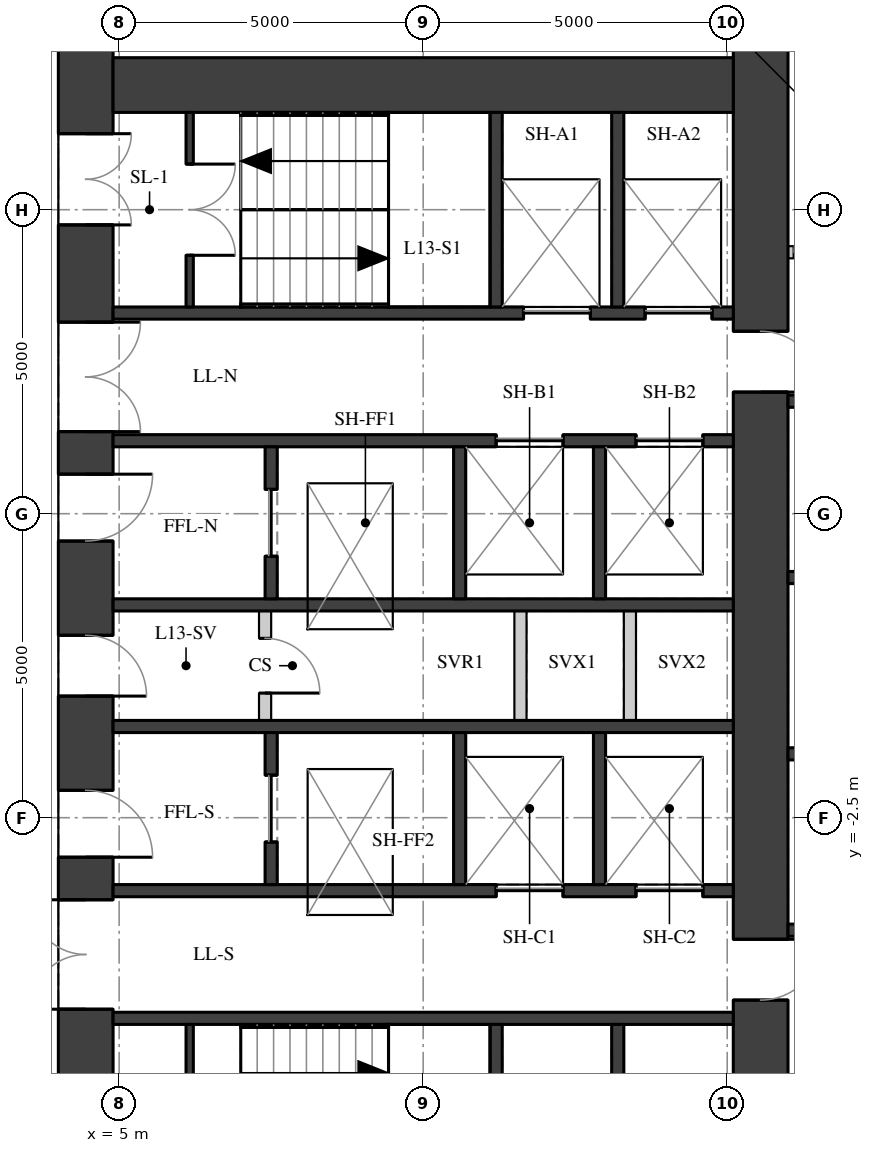
"""IFC4 building model, lengths in metres.
Left out: names, types, materials, properties, quantities, classifications, styles, units other than length and angle.
Written with IfcOpenShell. Run it as: python <this file> out.ifc"""

import sys

from ifc_helpers import new_model, si_unit, direction, frame, frame_2d, origin, place, context, subcontext, project, spatial, rectangle, extrude, element, fill, save


model = new_model("IFC4")
c1 = context("Model", 3, precision=1e-05, world=origin(), true_north=direction((0.0, 1.0)))
c2 = subcontext(c1, "Body", "Model", "MODEL_VIEW")
j1 = project(units=[si_unit("LENGTHUNIT", "METRE"), si_unit("PLANEANGLEUNIT", "RADIAN")], contexts=[c1])
p1 = place(None, origin())
s1 = spatial("IfcSite", under=j1, at=p1, CompositionType="ELEMENT")
p2 = place(p1, origin())
s2 = spatial("IfcBuilding", under=s1, at=p2, CompositionType="ELEMENT")
p3 = place(p2, frame((0.0, 0.0, 51.4)))
s3 = spatial("IfcBuildingStorey", under=s2, at=p3, CompositionType="ELEMENT", Elevation=51.4)
p4 = place(p3, frame((4.45, -11.1, 0.0), z_axis=(0.0, 0.0, 1.0), x_axis=(0.0, 1.0, 0.0)))
e1 = element("IfcWall", 1, at=p4, inside=s3, PredefinedType="SHEAR", context=c2, shape_type="SweptSolid", body=[
    extrude(rectangle(XDim=22.2, YDim=0.9, at=frame_2d((11.1, 0.0))), origin(), (0.0, 0.0, 1.0), 3.02),
])
p5 = place(p4, frame((2.35, 0.0, 0.0)))
e2 = element("IfcOpeningElement", 2, at=p5, cuts=e1, PredefinedType="OPENING", context=c2, shape_type="SweptSolid", body=[
    extrude(rectangle(XDim=1.5, YDim=2.1, at=frame_2d((0.75, 1.05))), frame((0.0, 0.46, 0.0), z_axis=(0.0, -1.0, 0.0), x_axis=(1.0, 0.0, 0.0)), (0.0, 0.0, 1.0), 0.92),
])
p6 = place(p4, frame((5.45, 0.0, 0.0)))
e3 = element("IfcOpeningElement", 3, at=p6, cuts=e1, PredefinedType="OPENING", context=c2, shape_type="SweptSolid", body=[
    extrude(rectangle(XDim=1.8, YDim=2.1, at=frame_2d((0.9, 1.05))), frame((0.0, 0.46, 0.0), z_axis=(0.0, -1.0, 0.0), x_axis=(1.0, 0.0, 0.0)), (0.0, 0.0, 1.0), 0.92),
])
p7 = place(p4, frame((7.95, 0.0, 0.0)))
e4 = element("IfcOpeningElement", 4, at=p7, cuts=e1, PredefinedType="OPENING", context=c2, shape_type="SweptSolid", body=[
    extrude(rectangle(XDim=1.1, YDim=2.1, at=frame_2d((0.55, 1.05))), frame((0.0, 0.46, 0.0), z_axis=(0.0, -1.0, 0.0), x_axis=(1.0, 0.0, 0.0)), (0.0, 0.0, 1.0), 0.92),
])
p8 = place(p4, frame((10.6, 0.0, 0.0)))
e5 = element("IfcOpeningElement", 5, at=p8, cuts=e1, PredefinedType="OPENING", context=c2, shape_type="SweptSolid", body=[
    extrude(rectangle(XDim=1.0, YDim=2.1, at=frame_2d((0.5, 1.05))), frame((0.0, 0.46, 0.0), z_axis=(0.0, -1.0, 0.0), x_axis=(1.0, 0.0, 0.0)), (0.0, 0.0, 1.0), 0.92),
])
p9 = place(p4, frame((13.15, 0.0, 0.0)))
e6 = element("IfcOpeningElement", 6, at=p9, cuts=e1, PredefinedType="OPENING", context=c2, shape_type="SweptSolid", body=[
    extrude(rectangle(XDim=1.1, YDim=2.1, at=frame_2d((0.55, 1.05))), frame((0.0, 0.46, 0.0), z_axis=(0.0, -1.0, 0.0), x_axis=(1.0, 0.0, 0.0)), (0.0, 0.0, 1.0), 0.92),
])
p10 = place(p4, frame((14.95, 0.0, 0.0)))
e7 = element("IfcOpeningElement", 7, at=p10, cuts=e1, PredefinedType="OPENING", context=c2, shape_type="SweptSolid", body=[
    extrude(rectangle(XDim=1.8, YDim=2.1, at=frame_2d((0.9, 1.05))), frame((0.0, 0.46, 0.0), z_axis=(0.0, -1.0, 0.0), x_axis=(1.0, 0.0, 0.0)), (0.0, 0.0, 1.0), 0.92),
])
p11 = place(p4, frame((18.35, 0.0, 0.0)))
e8 = element("IfcOpeningElement", 8, at=p11, cuts=e1, PredefinedType="OPENING", context=c2, shape_type="SweptSolid", body=[
    extrude(rectangle(XDim=1.5, YDim=2.1, at=frame_2d((0.75, 1.05))), frame((0.0, 0.46, 0.0), z_axis=(0.0, -1.0, 0.0), x_axis=(1.0, 0.0, 0.0)), (0.0, 0.0, 1.0), 0.92),
])
p12 = place(p3, frame((15.55, -11.1, 0.0), z_axis=(0.0, 0.0, 1.0), x_axis=(0.0, 1.0, 0.0)))
e9 = element("IfcWall", 9, at=p12, inside=s3, PredefinedType="SHEAR", context=c2, shape_type="SweptSolid", body=[
    extrude(rectangle(XDim=22.2, YDim=0.9, at=frame_2d((11.1, 0.0))), origin(), (0.0, 0.0, 1.0), 3.02),
])
p13 = place(p12, frame((15.6, 0.0, 0.0)))
e10 = element("IfcOpeningElement", 10, at=p13, cuts=e9, PredefinedType="OPENING", context=c2, shape_type="SweptSolid", body=[
    extrude(rectangle(XDim=1.0, YDim=2.1, at=frame_2d((0.5, 1.05))), frame((0.0, 0.46, 0.0), z_axis=(0.0, -1.0, 0.0), x_axis=(1.0, 0.0, 0.0)), (0.0, 0.0, 1.0), 0.92),
])
p14 = place(p12, frame((5.6, 0.0, 0.0)))
e11 = element("IfcOpeningElement", 11, at=p14, cuts=e9, PredefinedType="OPENING", context=c2, shape_type="SweptSolid", body=[
    extrude(rectangle(XDim=1.0, YDim=2.1, at=frame_2d((0.5, 1.05))), frame((0.0, 0.46, 0.0), z_axis=(0.0, -1.0, 0.0), x_axis=(1.0, 0.0, 0.0)), (0.0, 0.0, 1.0), 0.92),
])
p15 = place(p3, frame((4.9, 9.55, 0.0), z_axis=(0.0, 0.0, 1.0), x_axis=(1.0, 0.0, 0.0)))
e12 = element("IfcWall", 12, at=p15, inside=s3, PredefinedType="SHEAR", context=c2, shape_type="SweptSolid", body=[
    extrude(rectangle(XDim=10.2, YDim=0.9, at=frame_2d((5.1, 0.0))), origin(), (0.0, 0.0, 1.0), 3.02),
])
p16 = place(p3, frame((4.9, 5.8, 0.0), z_axis=(0.0, 0.0, 1.0), x_axis=(1.0, 0.0, 0.0)))
e13 = element("IfcWall", 13, at=p16, inside=s3, PredefinedType="SHEAR", context=c2, shape_type="SweptSolid", body=[
    extrude(rectangle(XDim=10.2, YDim=0.2, at=frame_2d((5.1, 0.0))), origin(), (0.0, 0.0, 1.0), 3.02),
])
p17 = place(p16, frame((6.75, 0.0, 0.0)))
e14 = element("IfcOpeningElement", 14, at=p17, cuts=e13, PredefinedType="OPENING", context=c2, shape_type="SweptSolid", body=[
    extrude(rectangle(XDim=1.1, YDim=2.1, at=frame_2d((0.55, 1.05))), frame((0.0, 0.11, 0.0), z_axis=(0.0, -1.0, 0.0), x_axis=(1.0, 0.0, 0.0)), (0.0, 0.0, 1.0), 0.22),
])
p18 = place(p16, frame((8.75, 0.0, 0.0)))
e15 = element("IfcOpeningElement", 15, at=p18, cuts=e13, PredefinedType="OPENING", context=c2, shape_type="SweptSolid", body=[
    extrude(rectangle(XDim=1.1, YDim=2.1, at=frame_2d((0.55, 1.05))), frame((0.0, 0.11, 0.0), z_axis=(0.0, -1.0, 0.0), x_axis=(1.0, 0.0, 0.0)), (0.0, 0.0, 1.0), 0.22),
])
p19 = place(p3, frame((4.9, 3.7, 0.0), z_axis=(0.0, 0.0, 1.0), x_axis=(1.0, 0.0, 0.0)))
e16 = element("IfcWall", 16, at=p19, inside=s3, PredefinedType="SHEAR", context=c2, shape_type="SweptSolid", body=[
    extrude(rectangle(XDim=10.2, YDim=0.2, at=frame_2d((5.1, 0.0))), origin(), (0.0, 0.0, 1.0), 3.02),
])
p20 = place(p19, frame((6.3, 0.0, 0.0)))
e17 = element("IfcOpeningElement", 17, at=p20, cuts=e16, PredefinedType="OPENING", context=c2, shape_type="SweptSolid", body=[
    extrude(rectangle(XDim=1.1, YDim=2.1, at=frame_2d((0.55, 1.05))), frame((0.0, 0.11, 0.0), z_axis=(0.0, -1.0, 0.0), x_axis=(1.0, 0.0, 0.0)), (0.0, 0.0, 1.0), 0.22),
])
p21 = place(p19, frame((8.6, 0.0, 0.0)))
e18 = element("IfcOpeningElement", 18, at=p21, cuts=e16, PredefinedType="OPENING", context=c2, shape_type="SweptSolid", body=[
    extrude(rectangle(XDim=1.1, YDim=2.1, at=frame_2d((0.55, 1.05))), frame((0.0, 0.11, 0.0), z_axis=(0.0, -1.0, 0.0), x_axis=(1.0, 0.0, 0.0)), (0.0, 0.0, 1.0), 0.22),
])
for number, where, z_axis, x_axis in (
    (19, (4.9, 1.0, 0.0), (0.0, 0.0, 1.0), (1.0, 0.0, 0.0)),
    (20, (4.9, -1.0, 0.0), (0.0, 0.0, 1.0), (1.0, 0.0, 0.0)),
):
    element("IfcWall", number, at=place(p3, frame(where, z_axis=z_axis, x_axis=x_axis)), inside=s3, PredefinedType="SHEAR", context=c2, shape_type="SweptSolid", body=[
        extrude(rectangle(XDim=10.2, YDim=0.2, at=frame_2d((5.1, 0.0))), origin(), (0.0, 0.0, 1.0), 3.02),
    ])
p22 = place(p3, frame((4.9, -3.7, 0.0), z_axis=(0.0, 0.0, 1.0), x_axis=(1.0, 0.0, 0.0)))
e21 = element("IfcWall", 21, at=p22, inside=s3, PredefinedType="SHEAR", context=c2, shape_type="SweptSolid", body=[
    extrude(rectangle(XDim=10.2, YDim=0.2, at=frame_2d((5.1, 0.0))), origin(), (0.0, 0.0, 1.0), 3.02),
])
p23 = place(p22, frame((6.3, 0.0, 0.0)))
e22 = element("IfcOpeningElement", 22, at=p23, cuts=e21, PredefinedType="OPENING", context=c2, shape_type="SweptSolid", body=[
    extrude(rectangle(XDim=1.1, YDim=2.1, at=frame_2d((0.55, 1.05))), frame((0.0, 0.11, 0.0), z_axis=(0.0, -1.0, 0.0), x_axis=(1.0, 0.0, 0.0)), (0.0, 0.0, 1.0), 0.22),
])
p24 = place(p22, frame((8.6, 0.0, 0.0)))
e23 = element("IfcOpeningElement", 23, at=p24, cuts=e21, PredefinedType="OPENING", context=c2, shape_type="SweptSolid", body=[
    extrude(rectangle(XDim=1.1, YDim=2.1, at=frame_2d((0.55, 1.05))), frame((0.0, 0.11, 0.0), z_axis=(0.0, -1.0, 0.0), x_axis=(1.0, 0.0, 0.0)), (0.0, 0.0, 1.0), 0.22),
])
p25 = place(p3, frame((4.9, -5.8, 0.0), z_axis=(0.0, 0.0, 1.0), x_axis=(1.0, 0.0, 0.0)))
e24 = element("IfcWall", 24, at=p25, inside=s3, PredefinedType="SHEAR", context=c2, shape_type="SweptSolid", body=[
    extrude(rectangle(XDim=10.2, YDim=0.2, at=frame_2d((5.1, 0.0))), origin(), (0.0, 0.0, 1.0), 3.02),
])
for number, where, z_axis, x_axis in (
    (25, (11.2, 5.9, 0.0), (0.0, 0.0, 1.0), (0.0, 1.0, 0.0)),
    (26, (11.2, -9.1, 0.0), (0.0, 0.0, 1.0), (0.0, 1.0, 0.0)),
    (27, (13.2, 5.9, 0.0), (0.0, 0.0, 1.0), (0.0, 1.0, 0.0)),
    (28, (13.2, -9.1, 0.0), (0.0, 0.0, 1.0), (0.0, 1.0, 0.0)),
):
    element("IfcWall", number, at=place(p3, frame(where, z_axis=z_axis, x_axis=x_axis)), inside=s3, PredefinedType="SHEAR", context=c2, shape_type="SweptSolid", body=[
        extrude(rectangle(XDim=3.2, YDim=0.2, at=frame_2d((1.6, 0.0))), origin(), (0.0, 0.0, 1.0), 3.02),
    ])
p26 = place(p3, frame((7.5, 1.1, 0.0), z_axis=(0.0, 0.0, 1.0), x_axis=(0.0, 1.0, 0.0)))
e29 = element("IfcWall", 29, at=p26, inside=s3, PredefinedType="SHEAR", context=c2, shape_type="SweptSolid", body=[
    extrude(rectangle(XDim=2.5, YDim=0.2, at=frame_2d((1.25, 0.0))), origin(), (0.0, 0.0, 1.0), 3.02),
])
p27 = place(p26, frame((0.7, 0.0, 0.0)))
e30 = element("IfcOpeningElement", 30, at=p27, cuts=e29, PredefinedType="OPENING", context=c2, shape_type="SweptSolid", body=[
    extrude(rectangle(XDim=1.1, YDim=2.1, at=frame_2d((0.55, 1.05))), frame((0.0, 0.11, 0.0), z_axis=(0.0, -1.0, 0.0), x_axis=(1.0, 0.0, 0.0)), (0.0, 0.0, 1.0), 0.22),
])
p28 = place(p3, frame((7.5, -3.6, 0.0), z_axis=(0.0, 0.0, 1.0), x_axis=(0.0, 1.0, 0.0)))
e31 = element("IfcWall", 31, at=p28, inside=s3, PredefinedType="SHEAR", context=c2, shape_type="SweptSolid", body=[
    extrude(rectangle(XDim=2.5, YDim=0.2, at=frame_2d((1.25, 0.0))), origin(), (0.0, 0.0, 1.0), 3.02),
])
p29 = place(p28, frame((0.7, 0.0, 0.0)))
e32 = element("IfcOpeningElement", 32, at=p29, cuts=e31, PredefinedType="OPENING", context=c2, shape_type="SweptSolid", body=[
    extrude(rectangle(XDim=1.1, YDim=2.1, at=frame_2d((0.55, 1.05))), frame((0.0, 0.11, 0.0), z_axis=(0.0, -1.0, 0.0), x_axis=(1.0, 0.0, 0.0)), (0.0, 0.0, 1.0), 0.22),
])
for number, where, z_axis, x_axis in (
    (33, (10.6, 1.1, 0.0), (0.0, 0.0, 1.0), (0.0, 1.0, 0.0)),
    (34, (10.6, -3.6, 0.0), (0.0, 0.0, 1.0), (0.0, 1.0, 0.0)),
    (35, (12.9, 1.1, 0.0), (0.0, 0.0, 1.0), (0.0, 1.0, 0.0)),
    (36, (12.9, -3.6, 0.0), (0.0, 0.0, 1.0), (0.0, 1.0, 0.0)),
):
    element("IfcWall", number, at=place(p3, frame(where, z_axis=z_axis, x_axis=x_axis)), inside=s3, PredefinedType="SHEAR", context=c2, shape_type="SweptSolid", body=[
        extrude(rectangle(XDim=2.5, YDim=0.2, at=frame_2d((1.25, 0.0))), origin(), (0.0, 0.0, 1.0), 3.02),
    ])
p30 = place(p3, frame((6.16, 5.9, 0.0), z_axis=(0.0, 0.0, 1.0), x_axis=(0.0, 1.0, 0.0)))
e37 = element("IfcWall", 37, at=p30, inside=s3, PredefinedType="SHEAR", context=c2, shape_type="SweptSolid", body=[
    extrude(rectangle(XDim=3.2, YDim=0.12, at=frame_2d((1.6, 0.0))), origin(), (0.0, 0.0, 1.0), 3.02),
])
p31 = place(p30, frame((0.85, 0.0, 0.0)))
e38 = element("IfcOpeningElement", 38, at=p31, cuts=e37, PredefinedType="OPENING", context=c2, shape_type="SweptSolid", body=[
    extrude(rectangle(XDim=1.5, YDim=2.1, at=frame_2d((0.75, 1.05))), frame((0.0, 0.07, 0.0), z_axis=(0.0, -1.0, 0.0), x_axis=(1.0, 0.0, 0.0)), (0.0, 0.0, 1.0), 0.14),
])
p32 = place(p3, frame((6.16, -9.1, 0.0), z_axis=(0.0, 0.0, 1.0), x_axis=(0.0, 1.0, 0.0)))
e39 = element("IfcWall", 39, at=p32, inside=s3, PredefinedType="SHEAR", context=c2, shape_type="SweptSolid", body=[
    extrude(rectangle(XDim=3.2, YDim=0.12, at=frame_2d((1.6, 0.0))), origin(), (0.0, 0.0, 1.0), 3.02),
])
p33 = place(p32, frame((0.85, 0.0, 0.0)))
e40 = element("IfcOpeningElement", 40, at=p33, cuts=e39, PredefinedType="OPENING", context=c2, shape_type="SweptSolid", body=[
    extrude(rectangle(XDim=1.5, YDim=2.1, at=frame_2d((0.75, 1.05))), frame((0.0, 0.07, 0.0), z_axis=(0.0, -1.0, 0.0), x_axis=(1.0, 0.0, 0.0)), (0.0, 0.0, 1.0), 0.14),
])
p34 = place(p3, frame((7.4, -0.9, 0.0), z_axis=(0.0, 0.0, 1.0), x_axis=(0.0, 1.0, 0.0)))
e41 = element("IfcWall", 41, at=p34, inside=s3, PredefinedType="PARTITIONING", context=c2, shape_type="SweptSolid", body=[
    extrude(rectangle(XDim=1.8, YDim=0.2, at=frame_2d((0.9, 0.0))), origin(), (0.0, 0.0, 1.0), 3.02),
])
p35 = place(p34, frame((0.45, 0.0, 0.0)))
e42 = element("IfcOpeningElement", 42, at=p35, cuts=e41, PredefinedType="OPENING", context=c2, shape_type="SweptSolid", body=[
    extrude(rectangle(XDim=0.9, YDim=2.1, at=frame_2d((0.45, 1.05))), frame((0.0, 0.11, 0.0), z_axis=(0.0, -1.0, 0.0), x_axis=(1.0, 0.0, 0.0)), (0.0, 0.0, 1.0), 0.22),
])
for number, where, z_axis, x_axis in (
    (43, (11.6, -0.9, 0.0), (0.0, 0.0, 1.0), (0.0, 1.0, 0.0)),
    (44, (13.4, -0.9, 0.0), (0.0, 0.0, 1.0), (0.0, 1.0, 0.0)),
):
    element("IfcWall", number, at=place(p3, frame(where, z_axis=z_axis, x_axis=x_axis)), inside=s3, PredefinedType="PARTITIONING", context=c2, shape_type="SweptSolid", body=[
        extrude(rectangle(XDim=1.8, YDim=0.2, at=frame_2d((0.9, 0.0))), origin(), (0.0, 0.0, 1.0), 3.02),
    ])
for number, where, z_axis, x_axis in (
    (45, (16.0, -4.35, 0.0), (0.0, 0.0, 1.0), (1.0, 0.0, 0.0)),
    (46, (16.0, -1.45, 0.0), (0.0, 0.0, 1.0), (1.0, 0.0, 0.0)),
    (47, (16.0, 1.45, 0.0), (0.0, 0.0, 1.0), (1.0, 0.0, 0.0)),
    (48, (16.0, 4.35, 0.0), (0.0, 0.0, 1.0), (1.0, 0.0, 0.0)),
):
    element("IfcWall", number, at=place(p3, frame(where, z_axis=z_axis, x_axis=x_axis)), inside=s3, PredefinedType="SHEAR", context=c2, shape_type="SweptSolid", body=[
        extrude(rectangle(XDim=2.3, YDim=0.2, at=frame_2d((1.15, 0.0))), origin(), (0.0, 0.0, 1.0), 3.02),
    ])
p36 = place(p3, frame((16.0, 6.8, 0.0), z_axis=(0.0, 0.0, 1.0), x_axis=(1.0, 0.0, 0.0)))
e49 = element("IfcWall", 49, at=p36, inside=s3, PredefinedType="PARTITIONING", context=c2, shape_type="SweptSolid", body=[
    extrude(rectangle(XDim=2.3, YDim=0.2, at=frame_2d((1.15, 0.0))), origin(), (0.0, 0.0, 1.0), 3.02),
])
p37 = place(p36, frame((0.1, 0.0, 0.0)))
e50 = element("IfcOpeningElement", 50, at=p37, cuts=e49, PredefinedType="OPENING", context=c2, shape_type="SweptSolid", body=[
    extrude(rectangle(XDim=0.9, YDim=2.1, at=frame_2d((0.45, 1.05))), frame((0.0, 0.11, 0.0), z_axis=(0.0, -1.0, 0.0), x_axis=(1.0, 0.0, 0.0)), (0.0, 0.0, 1.0), 0.22),
])
p38 = place(p6, origin())
e51 = element("IfcDoor", 51, at=p38, inside=s3, OperationType="DOUBLE_DOOR_SINGLE_SWING", PredefinedType="DOOR", context=c2, shape_type="SweptSolid", body=[
    extrude(rectangle(XDim=1.8, YDim=2.1, at=frame_2d((0.9, 1.05))), frame((0.0, 0.025, 0.0), z_axis=(0.0, -1.0, 0.0), x_axis=(1.0, 0.0, 0.0)), (0.0, 0.0, 1.0), 0.05),
])
fill(e3, e51)
p39 = place(p7, origin())
e52 = element("IfcDoor", 52, at=p39, inside=s3, OperationType="SINGLE_SWING_RIGHT", PredefinedType="DOOR", context=c2, shape_type="SweptSolid", body=[
    extrude(rectangle(XDim=1.1, YDim=2.1, at=frame_2d((0.55, 1.05))), frame((0.0, 0.025, 0.0), z_axis=(0.0, -1.0, 0.0), x_axis=(1.0, 0.0, 0.0)), (0.0, 0.0, 1.0), 0.05),
])
fill(e4, e52)
p40 = place(p8, origin())
e53 = element("IfcDoor", 53, at=p40, inside=s3, OperationType="SINGLE_SWING_RIGHT", PredefinedType="DOOR", context=c2, shape_type="SweptSolid", body=[
    extrude(rectangle(XDim=1.0, YDim=2.1, at=frame_2d((0.5, 1.05))), frame((0.0, 0.025, 0.0), z_axis=(0.0, -1.0, 0.0), x_axis=(1.0, 0.0, 0.0)), (0.0, 0.0, 1.0), 0.05),
])
fill(e5, e53)
p41 = place(p9, origin())
e54 = element("IfcDoor", 54, at=p41, inside=s3, OperationType="SINGLE_SWING_LEFT", PredefinedType="DOOR", context=c2, shape_type="SweptSolid", body=[
    extrude(rectangle(XDim=1.1, YDim=2.1, at=frame_2d((0.55, 1.05))), frame((0.0, 0.025, 0.0), z_axis=(0.0, -1.0, 0.0), x_axis=(1.0, 0.0, 0.0)), (0.0, 0.0, 1.0), 0.05),
])
fill(e6, e54)
p42 = place(p10, origin())
e55 = element("IfcDoor", 55, at=p42, inside=s3, OperationType="DOUBLE_DOOR_SINGLE_SWING", PredefinedType="DOOR", context=c2, shape_type="SweptSolid", body=[
    extrude(rectangle(XDim=1.8, YDim=2.1, at=frame_2d((0.9, 1.05))), frame((0.0, 0.025, 0.0), z_axis=(0.0, -1.0, 0.0), x_axis=(1.0, 0.0, 0.0)), (0.0, 0.0, 1.0), 0.05),
])
fill(e7, e55)
p43 = place(p11, origin())
e56 = element("IfcDoor", 56, at=p43, inside=s3, OperationType="DOUBLE_DOOR_SINGLE_SWING", PredefinedType="DOOR", context=c2, shape_type="SweptSolid", body=[
    extrude(rectangle(XDim=1.5, YDim=2.1, at=frame_2d((0.75, 1.05))), frame((0.0, 0.025, 0.0), z_axis=(0.0, -1.0, 0.0), x_axis=(1.0, 0.0, 0.0)), (0.0, 0.0, 1.0), 0.05),
])
fill(e8, e56)
p44 = place(p31, origin())
e57 = element("IfcDoor", 57, at=p44, inside=s3, OperationType="DOUBLE_DOOR_SINGLE_SWING", PredefinedType="DOOR", context=c2, shape_type="SweptSolid", body=[
    extrude(rectangle(XDim=1.5, YDim=2.1, at=frame_2d((0.75, 1.05))), frame((0.0, 0.025, 0.0), z_axis=(0.0, -1.0, 0.0), x_axis=(1.0, 0.0, 0.0)), (0.0, 0.0, 1.0), 0.05),
])
fill(e38, e57)
p45 = place(p17, origin())
e58 = element("IfcDoor", 58, at=p45, inside=s3, OperationType="DOUBLE_DOOR_SLIDING", PredefinedType="DOOR", context=c2, shape_type="SweptSolid", body=[
    extrude(rectangle(XDim=1.1, YDim=2.1, at=frame_2d((0.55, 1.05))), frame((0.0, 0.025, 0.0), z_axis=(0.0, -1.0, 0.0), x_axis=(1.0, 0.0, 0.0)), (0.0, 0.0, 1.0), 0.05),
])
fill(e14, e58)
p46 = place(p18, origin())
e59 = element("IfcDoor", 59, at=p46, inside=s3, OperationType="DOUBLE_DOOR_SLIDING", PredefinedType="DOOR", context=c2, shape_type="SweptSolid", body=[
    extrude(rectangle(XDim=1.1, YDim=2.1, at=frame_2d((0.55, 1.05))), frame((0.0, 0.025, 0.0), z_axis=(0.0, -1.0, 0.0), x_axis=(1.0, 0.0, 0.0)), (0.0, 0.0, 1.0), 0.05),
])
fill(e15, e59)
p47 = place(p20, origin())
e60 = element("IfcDoor", 60, at=p47, inside=s3, OperationType="DOUBLE_DOOR_SLIDING", PredefinedType="DOOR", context=c2, shape_type="SweptSolid", body=[
    extrude(rectangle(XDim=1.1, YDim=2.1, at=frame_2d((0.55, 1.05))), frame((0.0, 0.025, 0.0), z_axis=(0.0, -1.0, 0.0), x_axis=(1.0, 0.0, 0.0)), (0.0, 0.0, 1.0), 0.05),
])
fill(e17, e60)
p48 = place(p21, origin())
e61 = element("IfcDoor", 61, at=p48, inside=s3, OperationType="DOUBLE_DOOR_SLIDING", PredefinedType="DOOR", context=c2, shape_type="SweptSolid", body=[
    extrude(rectangle(XDim=1.1, YDim=2.1, at=frame_2d((0.55, 1.05))), frame((0.0, 0.025, 0.0), z_axis=(0.0, -1.0, 0.0), x_axis=(1.0, 0.0, 0.0)), (0.0, 0.0, 1.0), 0.05),
])
fill(e18, e61)
p49 = place(p23, origin())
e62 = element("IfcDoor", 62, at=p49, inside=s3, OperationType="DOUBLE_DOOR_SLIDING", PredefinedType="DOOR", context=c2, shape_type="SweptSolid", body=[
    extrude(rectangle(XDim=1.1, YDim=2.1, at=frame_2d((0.55, 1.05))), frame((0.0, 0.025, 0.0), z_axis=(0.0, -1.0, 0.0), x_axis=(1.0, 0.0, 0.0)), (0.0, 0.0, 1.0), 0.05),
])
fill(e22, e62)
p50 = place(p24, origin())
e63 = element("IfcDoor", 63, at=p50, inside=s3, OperationType="DOUBLE_DOOR_SLIDING", PredefinedType="DOOR", context=c2, shape_type="SweptSolid", body=[
    extrude(rectangle(XDim=1.1, YDim=2.1, at=frame_2d((0.55, 1.05))), frame((0.0, 0.025, 0.0), z_axis=(0.0, -1.0, 0.0), x_axis=(1.0, 0.0, 0.0)), (0.0, 0.0, 1.0), 0.05),
])
fill(e23, e63)
p51 = place(p27, origin())
e64 = element("IfcDoor", 64, at=p51, inside=s3, OperationType="DOUBLE_DOOR_SLIDING", PredefinedType="DOOR", context=c2, shape_type="SweptSolid", body=[
    extrude(rectangle(XDim=1.1, YDim=2.1, at=frame_2d((0.55, 1.05))), frame((0.0, 0.025, 0.0), z_axis=(0.0, -1.0, 0.0), x_axis=(1.0, 0.0, 0.0)), (0.0, 0.0, 1.0), 0.05),
])
fill(e30, e64)
p52 = place(p29, origin())
e65 = element("IfcDoor", 65, at=p52, inside=s3, OperationType="DOUBLE_DOOR_SLIDING", PredefinedType="DOOR", context=c2, shape_type="SweptSolid", body=[
    extrude(rectangle(XDim=1.1, YDim=2.1, at=frame_2d((0.55, 1.05))), frame((0.0, 0.025, 0.0), z_axis=(0.0, -1.0, 0.0), x_axis=(1.0, 0.0, 0.0)), (0.0, 0.0, 1.0), 0.05),
])
fill(e32, e65)
p53 = place(p35, origin())
e66 = element("IfcDoor", 66, at=p53, inside=s3, OperationType="SINGLE_SWING_RIGHT", PredefinedType="DOOR", context=c2, shape_type="SweptSolid", body=[
    extrude(rectangle(XDim=0.9, YDim=2.1, at=frame_2d((0.45, 1.05))), frame((0.0, 0.025, 0.0), z_axis=(0.0, -1.0, 0.0), x_axis=(1.0, 0.0, 0.0)), (0.0, 0.0, 1.0), 0.05),
])
fill(e42, e66)
p54 = place(p13, origin())
e67 = element("IfcDoor", 67, at=p54, inside=s3, OperationType="SINGLE_SWING_RIGHT", PredefinedType="DOOR", context=c2, shape_type="SweptSolid", body=[
    extrude(rectangle(XDim=1.0, YDim=2.1, at=frame_2d((0.5, 1.05))), frame((0.0, 0.025, 0.0), z_axis=(0.0, -1.0, 0.0), x_axis=(1.0, 0.0, 0.0)), (0.0, 0.0, 1.0), 0.05),
])
fill(e10, e67)
p55 = place(p14, origin())
e68 = element("IfcDoor", 68, at=p55, inside=s3, OperationType="SINGLE_SWING_LEFT", PredefinedType="DOOR", context=c2, shape_type="SweptSolid", body=[
    extrude(rectangle(XDim=1.0, YDim=2.1, at=frame_2d((0.5, 1.05))), frame((0.0, 0.025, 0.0), z_axis=(0.0, -1.0, 0.0), x_axis=(1.0, 0.0, 0.0)), (0.0, 0.0, 1.0), 0.05),
])
fill(e11, e68)
save(model, sys.argv[1])
